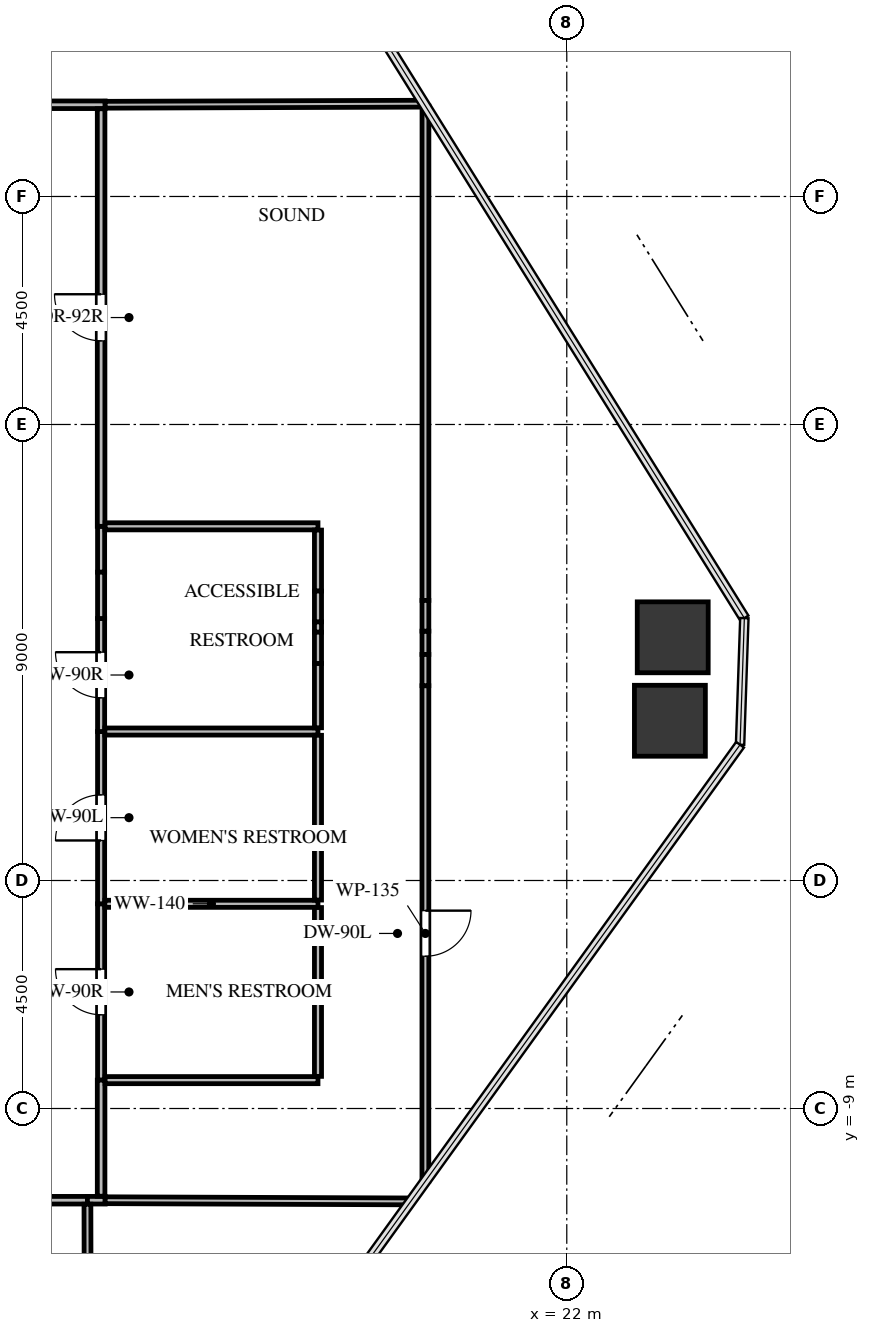
"""IFC4 building model, lengths in metres.
Left out: names, types, materials, properties, quantities, classifications, styles, units other than length and angle.
Written with IfcOpenShell. Run it as: python <this file> out.ifc"""

import sys

from ifc_helpers import new_model, si_unit, direction, frame, frame_2d, origin, origin_2d, place, context, subcontext, project, spatial, rectangle, extrude, source, transform, mapped, element, fill, save


model = new_model("IFC4")
c1 = context("Model", 3, precision=1e-05, world=origin(), true_north=direction((0.0, 1.0)))
c2 = subcontext(c1, "Body", "Model", "MODEL_VIEW")
j1 = project(units=[si_unit("LENGTHUNIT", "METRE"), si_unit("PLANEANGLEUNIT", "RADIAN")], contexts=[c1])
p1 = place(None, origin())
s1 = spatial("IfcSite", under=j1, at=p1, CompositionType="ELEMENT")
p2 = place(p1, origin())
s2 = spatial("IfcBuilding", under=s1, at=p2, CompositionType="ELEMENT")
p3 = place(p2, frame((0.0, 0.0, 62.1)))
s3 = spatial("IfcBuildingStorey", under=s2, at=p3, CompositionType="ELEMENT", Elevation=62.1)
m1 = source(origin(), c2, "Body", "SweptSolid", [
    extrude(rectangle(XDim=1.4, YDim=1.4, at=origin_2d()), origin(), (0.0, 0.0, 1.0), 3.3),
])
for number, where, z_axis, x_axis in (
    (1, (24.091, 0.3, -0.24), (0.0, 0.0, 1.0), (1.0, 0.0, 0.0)),
    (2, (24.035, -1.347, -0.24), (0.0, 0.0, 1.0), (1.0, 0.0, 0.0)),
):
    element("IfcColumn", number, at=place(p3, frame(where, z_axis=z_axis, x_axis=x_axis)), inside=s3, PredefinedType="COLUMN", context=c2, shape_type="MappedRepresentation", body=[
        mapped(m1, transform((0.0, 0.0, 0.0), x_axis=(1.0, 0.0, 0.0), y_axis=(0.0, 1.0, 0.0), z_axis=(0.0, 0.0, 1.0), scale=1.0)),
    ])
p4 = place(p3, frame((12.81, -8.44, 0.0), z_axis=(0.0, 0.0, 1.0), x_axis=(0.0, 1.0, 0.0)))
e3 = element("IfcWall", 3, at=p4, inside=s3, PredefinedType="PARTITIONING", context=c2, shape_type="SweptSolid", body=[
    extrude(rectangle(XDim=3.48, YDim=0.14, at=frame_2d((1.74, 0.0))), origin(), (0.0, 0.0, 1.0), 3.045),
])
p5 = place(p4, frame((1.29, 0.0, 0.0)))
e4 = element("IfcOpeningElement", 4, at=p5, cuts=e3, PredefinedType="OPENING", context=c2, shape_type="SweptSolid", body=[
    extrude(rectangle(XDim=0.9, YDim=2.05, at=frame_2d((0.45, 1.025))), frame((0.0, 0.08, 0.0), z_axis=(0.0, -1.0, 0.0), x_axis=(1.0, 0.0, 0.0)), (0.0, 0.0, 1.0), 0.16),
])
p6 = place(p3, frame((12.81, -4.96, 0.0), z_axis=(0.0, 0.0, 1.0), x_axis=(0.0, 1.0, 0.0)))
e5 = element("IfcWall", 5, at=p6, inside=s3, PredefinedType="PARTITIONING", context=c2, shape_type="SweptSolid", body=[
    extrude(rectangle(XDim=3.4, YDim=0.14, at=frame_2d((1.7, 0.0))), origin(), (0.0, 0.0, 1.0), 3.045),
])
p7 = place(p6, frame((1.25, 0.0, 0.0)))
e6 = element("IfcOpeningElement", 6, at=p7, cuts=e5, PredefinedType="OPENING", context=c2, shape_type="SweptSolid", body=[
    extrude(rectangle(XDim=0.9, YDim=2.05, at=frame_2d((0.45, 1.025))), frame((0.0, 0.08, 0.0), z_axis=(0.0, -1.0, 0.0), x_axis=(1.0, 0.0, 0.0)), (0.0, 0.0, 1.0), 0.16),
])
p8 = place(p3, frame((12.81, -1.56, 0.0), z_axis=(0.0, 0.0, 1.0), x_axis=(0.0, 1.0, 0.0)))
e7 = element("IfcWall", 7, at=p8, inside=s3, PredefinedType="PARTITIONING", context=c2, shape_type="SweptSolid", body=[
    extrude(rectangle(XDim=2.231, YDim=0.14, at=frame_2d((1.116, 0.0))), origin(), (0.0, 0.0, 1.0), 3.045),
])
p9 = place(p8, frame((0.666, 0.0, 0.0)))
e8 = element("IfcOpeningElement", 8, at=p9, cuts=e7, PredefinedType="OPENING", context=c2, shape_type="SweptSolid", body=[
    extrude(rectangle(XDim=0.9, YDim=2.05, at=frame_2d((0.45, 1.025))), frame((0.0, 0.08, 0.0), z_axis=(0.0, -1.0, 0.0), x_axis=(1.0, 0.0, 0.0)), (0.0, 0.0, 1.0), 0.16),
])
p10 = place(p3, frame((12.81, 1.585, 0.0), z_axis=(0.0, 0.0, 1.0), x_axis=(0.0, 1.0, 0.0)))
e9 = element("IfcWall", 9, at=p10, inside=s3, PredefinedType="PARTITIONING", context=c2, shape_type="SweptSolid", body=[
    extrude(rectangle(XDim=0.905, YDim=0.14, at=frame_2d((0.453, 0.0))), origin(), (0.0, 0.0, 1.0), 3.045),
])
p11 = place(p3, frame((12.81, 0.671, 0.0), z_axis=(0.0, 0.0, 1.0), x_axis=(0.0, 1.0, 0.0)))
e10 = element("IfcWall", 10, at=p11, inside=s3, PredefinedType="PARTITIONING", context=c2, shape_type="SweptSolid", body=[
    extrude(rectangle(XDim=0.914, YDim=0.14, at=frame_2d((0.457, 0.0))), origin(), (0.0, 0.0, 1.0), 2.13),
])
p12 = place(p3, frame((12.89, 10.81, 0.0), z_axis=(0.0, 0.0, 1.0), x_axis=(-1.0, 0.0, 0.0)))
e11 = element("IfcWall", 11, at=p12, inside=s3, PredefinedType="PARTITIONING", context=c2, shape_type="SweptSolid", body=[
    extrude(rectangle(XDim=1.847, YDim=0.15, at=frame_2d((0.924, 0.0))), origin(), (0.0, 0.0, 1.0), 3.045),
])
p13 = place(p3, frame((5.817, -10.81, 0.0), z_axis=(0.0, 0.0, 1.0), x_axis=(1.0, 0.0, 0.0)))
e12 = element("IfcWall", 12, at=p13, inside=s3, PredefinedType="PARTITIONING", context=c2, shape_type="SweptSolid", body=[
    extrude(rectangle(XDim=6.723, YDim=0.15, at=frame_2d((3.361, 0.0))), origin(), (0.0, 0.0, 1.0), 2.13),
])
p14 = place(p13, frame((2.911, 0.0, 0.0)))
e13 = element("IfcOpeningElement", 13, at=p14, cuts=e12, PredefinedType="OPENING", context=c2, shape_type="SweptSolid", body=[
    extrude(rectangle(XDim=0.9, YDim=2.05, at=frame_2d((0.45, 1.025))), frame((0.0, 0.085, 0.0), z_axis=(0.0, -1.0, 0.0), x_axis=(1.0, 0.0, 0.0)), (0.0, 0.0, 1.0), 0.17),
])
p15 = place(p3, frame((12.54, -10.81, 0.0), z_axis=(0.0, 0.0, 1.0), x_axis=(1.0, 0.0, 0.0)))
e14 = element("IfcWall", 14, at=p15, inside=s3, PredefinedType="PARTITIONING", context=c2, shape_type="SweptSolid", body=[
    extrude(rectangle(XDim=0.35, YDim=0.15, at=frame_2d((0.175, 0.0))), origin(), (0.0, 0.0, 1.0), 3.045),
])
p16 = place(p3, frame((12.81, 2.49, 0.0), z_axis=(0.0, 0.0, 1.0), x_axis=(0.0, 1.0, 0.0)))
e15 = element("IfcWall", 15, at=p16, inside=s3, PredefinedType="PARTITIONING", context=c2, shape_type="SweptSolid", body=[
    extrude(rectangle(XDim=8.241, YDim=0.15, at=frame_2d((4.121, 0.0))), origin(), (0.0, 0.0, 1.0), 3.045),
])
p17 = place(p16, frame((3.66, 0.0, 0.0)))
e16 = element("IfcOpeningElement", 16, at=p17, cuts=e15, PredefinedType="OPENING", context=c2, shape_type="SweptSolid", body=[
    extrude(rectangle(XDim=0.92, YDim=2.1, at=frame_2d((0.46, 1.05))), frame((0.0, 0.085, 0.0), z_axis=(0.0, -1.0, 0.0), x_axis=(1.0, 0.0, 0.0)), (0.0, 0.0, 1.0), 0.17),
])
p18 = place(p3, frame((12.81, -10.731, 0.0), z_axis=(0.0, 0.0, 1.0), x_axis=(0.0, 1.0, 0.0)))
e17 = element("IfcWall", 17, at=p18, inside=s3, PredefinedType="PARTITIONING", context=c2, shape_type="SweptSolid", body=[
    extrude(rectangle(XDim=2.291, YDim=0.15, at=frame_2d((1.146, 0.0))), origin(), (0.0, 0.0, 1.0), 3.045),
])
p19 = place(p3, frame((12.884, -4.96, 0.0), z_axis=(0.0, 0.0, 1.0), x_axis=(1.0, 0.0, 0.0)))
e18 = element("IfcWall", 18, at=p19, inside=s3, PredefinedType="PARTITIONING", context=c2, shape_type="SweptSolid", body=[
    extrude(rectangle(XDim=4.206, YDim=0.14, at=frame_2d((2.103, 0.0))), origin(), (0.0, 0.0, 1.0), 3.045),
])
p20 = place(p3, frame((17.09, -8.44, 0.0), z_axis=(0.0, 0.0, 1.0), x_axis=(-1.0, 0.0, 0.0)))
e19 = element("IfcWall", 19, at=p20, inside=s3, PredefinedType="PARTITIONING", context=c2, shape_type="SweptSolid", body=[
    extrude(rectangle(XDim=4.201, YDim=0.14, at=frame_2d((2.101, 0.0))), origin(), (0.0, 0.0, 1.0), 3.045),
])
p21 = place(p3, frame((17.09, -5.034, 0.0), z_axis=(0.0, 0.0, 1.0), x_axis=(0.0, -1.0, 0.0)))
e20 = element("IfcWall", 20, at=p21, inside=s3, PredefinedType="PARTITIONING", context=c2, shape_type="SweptSolid", body=[
    extrude(rectangle(XDim=3.332, YDim=0.14, at=frame_2d((1.666, 0.0))), origin(), (0.0, 0.0, 1.0), 3.045),
])
p22 = place(p3, frame((12.884, -1.56, 0.0), z_axis=(0.0, 0.0, 1.0), x_axis=(1.0, 0.0, 0.0)))
e21 = element("IfcWall", 21, at=p22, inside=s3, PredefinedType="PARTITIONING", context=c2, shape_type="SweptSolid", body=[
    extrude(rectangle(XDim=4.206, YDim=0.14, at=frame_2d((2.103, 0.0))), origin(), (0.0, 0.0, 1.0), 3.045),
])
p23 = place(p3, frame((17.09, -1.634, 0.0), z_axis=(0.0, 0.0, 1.0), x_axis=(0.0, -1.0, 0.0)))
e22 = element("IfcWall", 22, at=p23, inside=s3, PredefinedType="PARTITIONING", context=c2, shape_type="SweptSolid", body=[
    extrude(rectangle(XDim=3.252, YDim=0.14, at=frame_2d((1.626, 0.0))), origin(), (0.0, 0.0, 1.0), 3.045),
])
p24 = place(p3, frame((12.889, 2.49, 0.0), z_axis=(0.0, 0.0, 1.0), x_axis=(1.0, 0.0, 0.0)))
e23 = element("IfcWall", 23, at=p24, inside=s3, PredefinedType="PARTITIONING", context=c2, shape_type="SweptSolid", body=[
    extrude(rectangle(XDim=4.201, YDim=0.14, at=frame_2d((2.101, 0.0))), origin(), (0.0, 0.0, 1.0), 3.045),
])
p25 = place(p3, frame((17.09, 2.416, 0.0), z_axis=(0.0, 0.0, 1.0), x_axis=(0.0, -1.0, 0.0)))
e24 = element("IfcWall", 24, at=p25, inside=s3, PredefinedType="PARTITIONING", context=c2, shape_type="SweptSolid", body=[
    extrude(rectangle(XDim=1.204, YDim=0.14, at=frame_2d((0.602, 0.0))), origin(), (0.0, 0.0, 1.0), 3.045),
])
p26 = place(p3, frame((17.09, 0.606, 0.0), z_axis=(0.0, 0.0, 1.0), x_axis=(0.0, -1.0, 0.0)))
e25 = element("IfcWall", 25, at=p26, inside=s3, PredefinedType="PARTITIONING", context=c2, shape_type="SweptSolid", body=[
    extrude(rectangle(XDim=0.205, YDim=0.14, at=frame_2d((0.103, 0.0))), origin(), (0.0, 0.0, 1.0), 3.045),
])
p27 = place(p3, frame((17.09, -0.216, 0.0), z_axis=(0.0, 0.0, 1.0), x_axis=(0.0, -1.0, 0.0)))
e26 = element("IfcWall", 26, at=p27, inside=s3, PredefinedType="PARTITIONING", context=c2, shape_type="SweptSolid", body=[
    extrude(rectangle(XDim=1.27, YDim=0.14, at=frame_2d((0.635, 0.0))), origin(), (0.0, 0.0, 1.0), 3.045),
])
p28 = place(p3, frame((17.09, 1.212, 0.0), z_axis=(0.0, 0.0, 1.0), x_axis=(0.0, -1.0, 0.0)))
e27 = element("IfcWall", 27, at=p28, inside=s3, PredefinedType="PARTITIONING", context=c2, shape_type="SweptSolid", body=[
    extrude(rectangle(XDim=0.606, YDim=0.14, at=frame_2d((0.303, 0.0))), origin(), (0.0, 0.0, 1.0), 2.13),
])
p29 = place(p3, frame((17.09, 0.401, 0.0), z_axis=(0.0, 0.0, 1.0), x_axis=(0.0, -1.0, 0.0)))
e28 = element("IfcWall", 28, at=p29, inside=s3, PredefinedType="PARTITIONING", context=c2, shape_type="SweptSolid", body=[
    extrude(rectangle(XDim=0.617, YDim=0.14, at=frame_2d((0.309, 0.0))), origin(), (0.0, 0.0, 1.0), 2.13),
])
p30 = place(p3, frame((19.182, 10.831, 0.0), z_axis=(0.0, 0.0, 1.0), x_axis=(-0.999994432845, -0.003336806783, 0.0)))
e29 = element("IfcWall", 29, at=p30, inside=s3, PredefinedType="PARTITIONING", context=c2, shape_type="SweptSolid", body=[
    extrude(rectangle(XDim=6.292, YDim=0.135, at=frame_2d((3.146, 0.0))), origin(), (0.0, 0.0, 1.0), 2.38),
])
p31 = place(p3, frame((12.54, -10.889, 0.0), z_axis=(0.0, 0.0, 1.0), x_axis=(0.002115348101, -0.999997762649, 0.0)))
e30 = element("IfcWall", 30, at=p31, inside=s3, PredefinedType="PARTITIONING", context=c2, shape_type="SweptSolid", body=[
    extrude(rectangle(XDim=7.386, YDim=0.135, at=frame_2d((3.693, 0.0))), origin(), (0.0, 0.0, 1.0), 2.38),
])
p32 = place(p31, frame((3.243, 0.0, 0.0)))
e31 = element("IfcOpeningElement", 31, at=p32, cuts=e30, PredefinedType="OPENING", context=c2, shape_type="SweptSolid", body=[
    extrude(rectangle(XDim=0.9, YDim=2.05, at=frame_2d((0.45, 1.025))), frame((0.0, 0.078, 0.0), z_axis=(0.0, -1.0, 0.0), x_axis=(1.0, 0.0, 0.0)), (0.0, 0.0, 1.0), 0.155),
])
p33 = place(p3, frame((12.89, -10.81, 0.0), z_axis=(0.0, 0.0, 1.0), x_axis=(0.999992607823, -0.003845035728, 0.0)))
e32 = element("IfcWall", 32, at=p33, inside=s3, PredefinedType="PARTITIONING", context=c2, shape_type="SweptSolid", body=[
    extrude(rectangle(XDim=6.032, YDim=0.135, at=frame_2d((3.016, 0.0))), origin(), (0.0, 0.0, 1.0), 2.38),
])
p34 = place(p3, frame((19.211, 10.785, 0.0), z_axis=(0.0, 0.0, 1.0), x_axis=(-7.5063804e-05, -0.999999997183, 0.0)))
e33 = element("IfcWall", 33, at=p34, inside=s3, PredefinedType="PARTITIONING", context=c2, shape_type="SweptSolid", body=[
    extrude(rectangle(XDim=9.757, YDim=0.135, at=frame_2d((4.879, 0.0))), origin(), (0.0, 0.0, 1.0), 2.38),
])
p35 = place(p3, frame((19.21, 0.421, 0.0), z_axis=(0.0, 0.0, 1.0), x_axis=(0.0, -1.0, 0.0)))
e34 = element("IfcWall", 34, at=p35, inside=s3, PredefinedType="PARTITIONING", context=c2, shape_type="SweptSolid", body=[
    extrude(rectangle(XDim=0.46, YDim=0.135, at=frame_2d((0.23, 0.0))), origin(), (0.0, 0.0, 1.0), 3.045),
])
p36 = place(p3, frame((19.21, -0.656, 0.0), z_axis=(0.0, 0.0, 1.0), x_axis=(-7.4898886e-05, -0.999999997195, 0.0)))
e35 = element("IfcWall", 35, at=p36, inside=s3, PredefinedType="PARTITIONING", context=c2, shape_type="SweptSolid", body=[
    extrude(rectangle(XDim=9.779, YDim=0.135, at=frame_2d((4.889, 0.0))), origin(), (0.0, 0.0, 1.0), 2.38),
])
p37 = place(p36, frame((4.439, 0.0, 0.0)))
e36 = element("IfcOpeningElement", 36, at=p37, cuts=e35, PredefinedType="OPENING", context=c2, shape_type="SweptSolid", body=[
    extrude(rectangle(XDim=0.9, YDim=2.05, at=frame_2d((0.45, 1.025))), frame((0.0, 0.078, 0.0), z_axis=(0.0, -1.0, 0.0), x_axis=(1.0, 0.0, 0.0)), (0.0, 0.0, 1.0), 0.155),
])
p38 = place(p3, frame((19.21, 1.028, 0.0), z_axis=(0.0, 0.0, 1.0), x_axis=(0.0, -1.0, 0.0)))
e37 = element("IfcWall", 37, at=p38, inside=s3, PredefinedType="PARTITIONING", context=c2, shape_type="SweptSolid", body=[
    extrude(rectangle(XDim=0.606, YDim=0.135, at=frame_2d((0.303, 0.0))), origin(), (0.0, 0.0, 1.0), 2.13),
])
p39 = place(p3, frame((19.21, -0.039, 0.0), z_axis=(0.0, 0.0, 1.0), x_axis=(0.0, -1.0, 0.0)))
e38 = element("IfcWall", 38, at=p39, inside=s3, PredefinedType="PARTITIONING", context=c2, shape_type="SweptSolid", body=[
    extrude(rectangle(XDim=0.617, YDim=0.135, at=frame_2d((0.308, 0.0))), origin(), (0.0, 0.0, 1.0), 2.13),
])
m2 = source(origin(), c2, "Body", "SweptSolid", [
    extrude(rectangle(XDim=0.9, YDim=2.05, at=frame_2d((0.45, 1.025))), frame((0.0, 0.025, 0.0), z_axis=(0.0, -1.0, 0.0), x_axis=(1.0, 0.0, 0.0)), (0.0, 0.0, 1.0), 0.05),
])
p40 = place(p5, origin())
e39 = element("IfcDoor", 39, at=p40, inside=s3, OperationType="SINGLE_SWING_RIGHT", PredefinedType="DOOR", context=c2, shape_type="MappedRepresentation", body=[
    mapped(m2, transform((0.0, 0.0, 0.0), x_axis=(1.0, 0.0, 0.0), y_axis=(0.0, 1.0, 0.0), z_axis=(0.0, 0.0, 1.0), scale=1.0)),
])
fill(e4, e39)
m3 = source(origin(), c2, "Body", "SweptSolid", [
    extrude(rectangle(XDim=0.9, YDim=2.05, at=frame_2d((0.45, 1.025))), frame((0.0, 0.025, 0.0), z_axis=(0.0, -1.0, 0.0), x_axis=(1.0, 0.0, 0.0)), (0.0, 0.0, 1.0), 0.05),
])
p41 = place(p7, origin())
e40 = element("IfcDoor", 40, at=p41, inside=s3, OperationType="SINGLE_SWING_LEFT", PredefinedType="DOOR", context=c2, shape_type="MappedRepresentation", body=[
    mapped(m3, transform((0.0, 0.0, 0.0), x_axis=(1.0, 0.0, 0.0), y_axis=(0.0, 1.0, 0.0), z_axis=(0.0, 0.0, 1.0), scale=1.0)),
])
fill(e6, e40)
p42 = place(p9, origin())
e41 = element("IfcDoor", 41, at=p42, inside=s3, OperationType="SINGLE_SWING_RIGHT", PredefinedType="DOOR", context=c2, shape_type="MappedRepresentation", body=[
    mapped(m2, transform((0.0, 0.0, 0.0), x_axis=(1.0, 0.0, 0.0), y_axis=(0.0, 1.0, 0.0), z_axis=(0.0, 0.0, 1.0), scale=1.0)),
])
fill(e8, e41)
m4 = source(origin(), c2, "Body", "SweptSolid", [
    extrude(rectangle(XDim=0.92, YDim=2.1, at=frame_2d((0.46, 1.05))), frame((0.0, 0.025, 0.0), z_axis=(0.0, -1.0, 0.0), x_axis=(1.0, 0.0, 0.0)), (0.0, 0.0, 1.0), 0.05),
])
p43 = place(p17, origin())
e42 = element("IfcDoor", 42, at=p43, inside=s3, OperationType="SINGLE_SWING_RIGHT", PredefinedType="DOOR", context=c2, shape_type="MappedRepresentation", body=[
    mapped(m4, transform((0.0, 0.0, 0.0), x_axis=(1.0, 0.0, 0.0), y_axis=(0.0, 1.0, 0.0), z_axis=(0.0, 0.0, 1.0), scale=1.0)),
])
fill(e16, e42)
p44 = place(p37, origin())
e43 = element("IfcDoor", 43, at=p44, inside=s3, OperationType="SINGLE_SWING_LEFT", PredefinedType="DOOR", context=c2, shape_type="MappedRepresentation", body=[
    mapped(m3, transform((0.0, 0.0, 0.0), x_axis=(1.0, 0.0, 0.0), y_axis=(0.0, 1.0, 0.0), z_axis=(0.0, 0.0, 1.0), scale=1.0)),
])
fill(e36, e43)
save(model, sys.argv[1])
